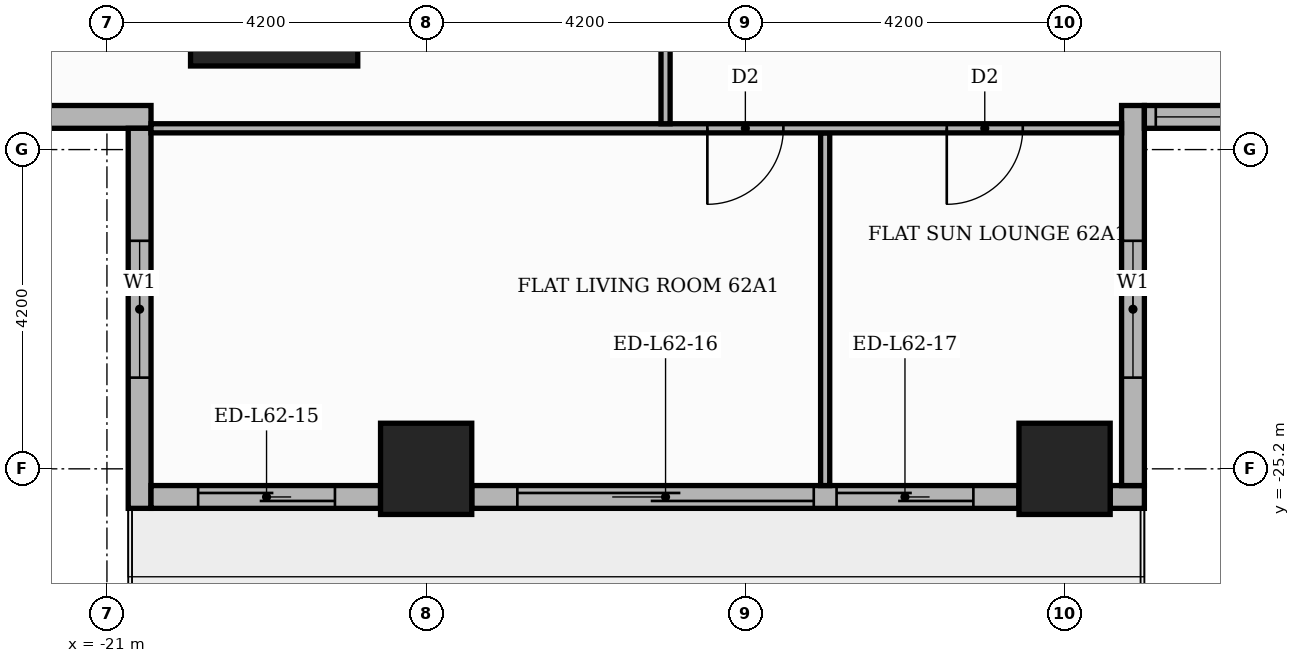
"""IFC4 building model, lengths in metres.
Left out: names, types, materials, properties, quantities, classifications, styles, units other than length and angle.
Written with IfcOpenShell. Run it as: python <this file> out.ifc"""

import sys

from ifc_helpers import new_model, si_unit, direction, frame, frame_2d, origin, origin_2d, place, context, subcontext, project, spatial, rectangle, extrude, element, fill, save


model = new_model("IFC4")
c1 = context("Model", 3, precision=1e-05, world=origin(), true_north=direction((0.0, 1.0)))
c2 = subcontext(c1, "Body", "Model", "MODEL_VIEW")
j1 = project(units=[si_unit("LENGTHUNIT", "METRE"), si_unit("PLANEANGLEUNIT", "RADIAN")], contexts=[c1])
p1 = place(None, origin())
s1 = spatial("IfcSite", under=j1, at=p1, CompositionType="ELEMENT")
p2 = place(p1, origin())
s2 = spatial("IfcBuilding", under=s1, at=p2, CompositionType="ELEMENT")
p3 = place(p2, frame((0.0, 0.0, 260.1)))
s3 = spatial("IfcBuildingStorey", under=s2, at=p3, CompositionType="ELEMENT", Elevation=260.1)
p4 = place(p3, frame((-18.8, -18.8, 0.0), z_axis=(0.0, 0.0, 1.0), x_axis=(1.0, 0.0, 0.0)))
e1 = element("IfcColumn", 1, at=p4, inside=s3, PredefinedType="COLUMN", context=c2, shape_type="SweptSolid", body=[
    extrude(rectangle(XDim=2.2, YDim=2.2, at=origin_2d()), origin(), (0.0, 0.0, 1.0), 3.9),
])
for number, where, z_axis, x_axis in (
    (2, (-8.4, -25.2, 0.0), (0.0, 0.0, 1.0), (1.0, 0.0, 0.0)),
    (3, (-16.8, -25.2, 0.0), (0.0, 0.0, 1.0), (1.0, 0.0, 0.0)),
):
    element("IfcColumn", number, at=place(p3, frame(where, z_axis=z_axis, x_axis=x_axis)), inside=s3, PredefinedType="COLUMN", context=c2, shape_type="SweptSolid", body=[
        extrude(rectangle(XDim=1.2, YDim=1.2, at=origin_2d()), origin(), (0.0, 0.0, 1.0), 3.9),
    ])
p5 = place(p3, frame((-25.42, -20.57, 0.0), z_axis=(0.0, 0.0, 1.0), x_axis=(1.0, 0.0, 0.0)))
e4 = element("IfcWall", 4, at=p5, inside=s3, PredefinedType="STANDARD", context=c2, shape_type="SweptSolid", body=[
    extrude(rectangle(XDim=5.0, YDim=0.3, at=frame_2d((2.5, 0.0))), origin(), (0.0, 0.0, 1.0), 3.48),
])
p6 = place(p5, frame((1.42, 0.0, 0.9)))
e5 = element("IfcOpeningElement", 5, at=p6, cuts=e4, PredefinedType="OPENING", context=c2, shape_type="SweptSolid", body=[
    extrude(rectangle(XDim=1.8, YDim=2.1, at=frame_2d((0.9, 1.05))), frame((0.0, 0.16, 0.0), z_axis=(0.0, -1.0, 0.0), x_axis=(1.0, 0.0, 0.0)), (0.0, 0.0, 1.0), 0.32),
])
p7 = place(p3, frame((-20.57, -20.72, 0.0), z_axis=(0.0, 0.0, 1.0), x_axis=(0.0, -1.0, 0.0)))
e6 = element("IfcWall", 6, at=p7, inside=s3, PredefinedType="STANDARD", context=c2, shape_type="SweptSolid", body=[
    extrude(rectangle(XDim=5.0, YDim=0.3, at=frame_2d((2.5, 0.0))), origin(), (0.0, 0.0, 1.0), 3.48),
])
p8 = place(p7, frame((1.48, 0.0, 0.9)))
e7 = element("IfcOpeningElement", 7, at=p8, cuts=e6, PredefinedType="OPENING", context=c2, shape_type="SweptSolid", body=[
    extrude(rectangle(XDim=1.8, YDim=2.1, at=frame_2d((0.9, 1.05))), frame((0.0, 0.16, 0.0), z_axis=(0.0, -1.0, 0.0), x_axis=(1.0, 0.0, 0.0)), (0.0, 0.0, 1.0), 0.32),
])
p9 = place(p3, frame((-20.42, -25.57, 0.0), z_axis=(0.0, 0.0, 1.0), x_axis=(1.0, 0.0, 0.0)))
e8 = element("IfcWall", 8, at=p9, inside=s3, PredefinedType="STANDARD", context=c2, shape_type="SweptSolid", body=[
    extrude(rectangle(XDim=3.02, YDim=0.3, at=frame_2d((1.51, 0.0))), origin(), (0.0, 0.0, 1.0), 3.48),
])
p10 = place(p9, frame((0.62, 0.0, 0.0)))
e9 = element("IfcOpeningElement", 9, at=p10, cuts=e8, PredefinedType="OPENING", context=c2, shape_type="SweptSolid", body=[
    extrude(rectangle(XDim=1.8, YDim=2.4, at=frame_2d((0.9, 1.2))), frame((0.0, 0.16, 0.0), z_axis=(0.0, -1.0, 0.0), x_axis=(1.0, 0.0, 0.0)), (0.0, 0.0, 1.0), 0.32),
])
p11 = place(p3, frame((-16.2, -25.57, 0.0), z_axis=(0.0, 0.0, 1.0), x_axis=(1.0, 0.0, 0.0)))
e10 = element("IfcWall", 10, at=p11, inside=s3, PredefinedType="STANDARD", context=c2, shape_type="SweptSolid", body=[
    extrude(rectangle(XDim=7.2, YDim=0.3, at=frame_2d((3.6, 0.0))), origin(), (0.0, 0.0, 1.0), 3.48),
])
p12 = place(p11, frame((0.6, 0.0, 0.0)))
e11 = element("IfcOpeningElement", 11, at=p12, cuts=e10, PredefinedType="OPENING", context=c2, shape_type="SweptSolid", body=[
    extrude(rectangle(XDim=3.9, YDim=2.4, at=frame_2d((1.95, 1.2))), frame((0.0, 0.16, 0.0), z_axis=(0.0, -1.0, 0.0), x_axis=(1.0, 0.0, 0.0)), (0.0, 0.0, 1.0), 0.32),
])
p13 = place(p11, frame((4.8, 0.0, 0.0)))
e12 = element("IfcOpeningElement", 12, at=p13, cuts=e10, PredefinedType="OPENING", context=c2, shape_type="SweptSolid", body=[
    extrude(rectangle(XDim=1.8, YDim=2.4, at=frame_2d((0.9, 1.2))), frame((0.0, 0.16, 0.0), z_axis=(0.0, -1.0, 0.0), x_axis=(1.0, 0.0, 0.0)), (0.0, 0.0, 1.0), 0.32),
])
p14 = place(p3, frame((-7.8, -25.57, 0.0), z_axis=(0.0, 0.0, 1.0), x_axis=(1.0, 0.0, 0.0)))
e13 = element("IfcWall", 13, at=p14, inside=s3, PredefinedType="STANDARD", context=c2, shape_type="SweptSolid", body=[
    extrude(rectangle(XDim=0.45, YDim=0.3, at=frame_2d((0.225, 0.0))), origin(), (0.0, 0.0, 1.0), 3.48),
])
p15 = place(p3, frame((-7.5, -25.42, 0.0), z_axis=(0.0, 0.0, 1.0), x_axis=(0.0, 1.0, 0.0)))
e14 = element("IfcWall", 14, at=p15, inside=s3, PredefinedType="STANDARD", context=c2, shape_type="SweptSolid", body=[
    extrude(rectangle(XDim=5.0, YDim=0.3, at=frame_2d((2.5, 0.0))), origin(), (0.0, 0.0, 1.0), 3.48),
])
p16 = place(p15, frame((1.42, 0.0, 0.9)))
e15 = element("IfcOpeningElement", 15, at=p16, cuts=e14, PredefinedType="OPENING", context=c2, shape_type="SweptSolid", body=[
    extrude(rectangle(XDim=1.8, YDim=2.1, at=frame_2d((0.9, 1.05))), frame((0.0, 0.16, 0.0), z_axis=(0.0, -1.0, 0.0), x_axis=(1.0, 0.0, 0.0)), (0.0, 0.0, 1.0), 0.32),
])
p17 = place(p3, frame((-7.35, -20.57, 0.0), z_axis=(0.0, 0.0, 1.0), x_axis=(1.0, 0.0, 0.0)))
e16 = element("IfcWall", 16, at=p17, inside=s3, PredefinedType="STANDARD", context=c2, shape_type="SweptSolid", body=[
    extrude(rectangle(XDim=15.0, YDim=0.3, at=frame_2d((7.5, 0.0))), origin(), (0.0, 0.0, 1.0), 3.48),
])
p18 = place(p17, frame((0.15, 0.0, 0.9)))
e17 = element("IfcOpeningElement", 17, at=p18, cuts=e16, PredefinedType="OPENING", context=c2, shape_type="SweptSolid", body=[
    extrude(rectangle(XDim=6.0, YDim=2.1, at=frame_2d((3.0, 1.05))), frame((0.0, 0.16, 0.0), z_axis=(0.0, -1.0, 0.0), x_axis=(1.0, 0.0, 0.0)), (0.0, 0.0, 1.0), 0.32),
])
p19 = place(p17, frame((6.45, 0.0, 0.9)))
e18 = element("IfcOpeningElement", 18, at=p19, cuts=e16, PredefinedType="OPENING", context=c2, shape_type="SweptSolid", body=[
    extrude(rectangle(XDim=6.0, YDim=2.1, at=frame_2d((3.0, 1.05))), frame((0.0, 0.16, 0.0), z_axis=(0.0, -1.0, 0.0), x_axis=(1.0, 0.0, 0.0)), (0.0, 0.0, 1.0), 0.32),
])
p20 = place(p17, frame((12.75, 0.0, 0.9)))
e19 = element("IfcOpeningElement", 19, at=p20, cuts=e16, PredefinedType="OPENING", context=c2, shape_type="SweptSolid", body=[
    extrude(rectangle(XDim=1.8, YDim=2.1, at=frame_2d((0.9, 1.05))), frame((0.0, 0.16, 0.0), z_axis=(0.0, -1.0, 0.0), x_axis=(1.0, 0.0, 0.0)), (0.0, 0.0, 1.0), 0.32),
])
p21 = place(p3, frame((-11.55, -25.42, 0.0), z_axis=(0.0, 0.0, 1.0), x_axis=(0.0, 1.0, 0.0)))
e20 = element("IfcWall", 20, at=p21, inside=s3, PredefinedType="PARTITIONING", context=c2, shape_type="SweptSolid", body=[
    extrude(rectangle(XDim=4.64, YDim=0.12, at=frame_2d((2.32, 0.0))), origin(), (0.0, 0.0, 1.0), 3.48),
])
p22 = place(p3, frame((-20.42, -20.72, 0.0), z_axis=(0.0, 0.0, 1.0), x_axis=(1.0, 0.0, 0.0)))
e21 = element("IfcWall", 21, at=p22, inside=s3, PredefinedType="PARTITIONING", context=c2, shape_type="SweptSolid", body=[
    extrude(rectangle(XDim=12.77, YDim=0.12, at=frame_2d((6.385, 0.0))), origin(), (0.0, 0.0, 1.0), 3.48),
])
p23 = place(p22, frame((7.32, 0.0, 0.0)))
e22 = element("IfcOpeningElement", 22, at=p23, cuts=e21, PredefinedType="OPENING", context=c2, shape_type="SweptSolid", body=[
    extrude(rectangle(XDim=1.0, YDim=2.1, at=frame_2d((0.5, 1.05))), frame((0.0, 0.07, 0.0), z_axis=(0.0, -1.0, 0.0), x_axis=(1.0, 0.0, 0.0)), (0.0, 0.0, 1.0), 0.14),
])
p24 = place(p22, frame((10.47, 0.0, 0.0)))
e23 = element("IfcOpeningElement", 23, at=p24, cuts=e21, PredefinedType="OPENING", context=c2, shape_type="SweptSolid", body=[
    extrude(rectangle(XDim=1.0, YDim=2.1, at=frame_2d((0.5, 1.05))), frame((0.0, 0.07, 0.0), z_axis=(0.0, -1.0, 0.0), x_axis=(1.0, 0.0, 0.0)), (0.0, 0.0, 1.0), 0.14),
])
p25 = place(p3, frame((-13.65, -20.66, 0.0), z_axis=(0.0, 0.0, 1.0), x_axis=(0.0, 1.0, 0.0)))
e24 = element("IfcWall", 24, at=p25, inside=s3, PredefinedType="PARTITIONING", context=c2, shape_type="SweptSolid", body=[
    extrude(rectangle(XDim=6.91, YDim=0.12, at=frame_2d((3.455, 0.0))), origin(), (0.0, 0.0, 1.0), 3.48),
])
p26 = place(p25, frame((3.025, 0.0, 0.0)))
e25 = element("IfcOpeningElement", 25, at=p26, cuts=e24, PredefinedType="OPENING", context=c2, shape_type="SweptSolid", body=[
    extrude(rectangle(XDim=0.9, YDim=2.1, at=frame_2d((0.45, 1.05))), frame((0.0, 0.07, 0.0), z_axis=(0.0, -1.0, 0.0), x_axis=(1.0, 0.0, 0.0)), (0.0, 0.0, 1.0), 0.14),
])
p27 = place(p8, origin())
e26 = element("IfcWindow", 26, at=p27, inside=s3, PartitioningType="SINGLE_PANEL", PredefinedType="WINDOW", context=c2, shape_type="SweptSolid", body=[
    extrude(rectangle(XDim=1.8, YDim=2.1, at=frame_2d((0.9, 1.05))), frame((0.0, 0.03, 0.0), z_axis=(0.0, -1.0, 0.0), x_axis=(1.0, 0.0, 0.0)), (0.0, 0.0, 1.0), 0.06),
])
fill(e7, e26)
p28 = place(p10, origin())
e27 = element("IfcDoor", 27, at=p28, inside=s3, OperationType="SLIDING_TO_RIGHT", PredefinedType="DOOR", context=c2, shape_type="SweptSolid", body=[
    extrude(rectangle(XDim=1.8, YDim=2.4, at=frame_2d((0.9, 1.2))), frame((0.0, 0.025, 0.0), z_axis=(0.0, -1.0, 0.0), x_axis=(1.0, 0.0, 0.0)), (0.0, 0.0, 1.0), 0.05),
])
fill(e9, e27)
p29 = place(p12, origin())
e28 = element("IfcDoor", 28, at=p29, inside=s3, OperationType="SLIDING_TO_LEFT", PredefinedType="DOOR", context=c2, shape_type="SweptSolid", body=[
    extrude(rectangle(XDim=3.9, YDim=2.4, at=frame_2d((1.95, 1.2))), frame((0.0, 0.025, 0.0), z_axis=(0.0, -1.0, 0.0), x_axis=(1.0, 0.0, 0.0)), (0.0, 0.0, 1.0), 0.05),
])
fill(e11, e28)
p30 = place(p13, origin())
e29 = element("IfcDoor", 29, at=p30, inside=s3, OperationType="SLIDING_TO_RIGHT", PredefinedType="DOOR", context=c2, shape_type="SweptSolid", body=[
    extrude(rectangle(XDim=1.8, YDim=2.4, at=frame_2d((0.9, 1.2))), frame((0.0, 0.025, 0.0), z_axis=(0.0, -1.0, 0.0), x_axis=(1.0, 0.0, 0.0)), (0.0, 0.0, 1.0), 0.05),
])
fill(e12, e29)
p31 = place(p16, origin())
e30 = element("IfcWindow", 30, at=p31, inside=s3, PartitioningType="SINGLE_PANEL", PredefinedType="WINDOW", context=c2, shape_type="SweptSolid", body=[
    extrude(rectangle(XDim=1.8, YDim=2.1, at=frame_2d((0.9, 1.05))), frame((0.0, 0.03, 0.0), z_axis=(0.0, -1.0, 0.0), x_axis=(1.0, 0.0, 0.0)), (0.0, 0.0, 1.0), 0.06),
])
fill(e15, e30)
p32 = place(p18, origin())
e31 = element("IfcWindow", 31, at=p32, inside=s3, PartitioningType="SINGLE_PANEL", PredefinedType="WINDOW", context=c2, shape_type="SweptSolid", body=[
    extrude(rectangle(XDim=6.0, YDim=2.1, at=frame_2d((3.0, 1.05))), frame((0.0, 0.03, 0.0), z_axis=(0.0, -1.0, 0.0), x_axis=(1.0, 0.0, 0.0)), (0.0, 0.0, 1.0), 0.06),
])
fill(e17, e31)
p33 = place(p23, frame((1.0, 0.0, 0.0), z_axis=(0.0, 0.0, 1.0), x_axis=(-1.0, 0.0, 0.0)))
e32 = element("IfcDoor", 32, at=p33, inside=s3, OperationType="SINGLE_SWING_LEFT", PredefinedType="DOOR", context=c2, shape_type="SweptSolid", body=[
    extrude(rectangle(XDim=1.0, YDim=2.1, at=frame_2d((0.5, 1.05))), frame((0.0, 0.025, 0.0), z_axis=(0.0, -1.0, 0.0), x_axis=(1.0, 0.0, 0.0)), (0.0, 0.0, 1.0), 0.05),
])
fill(e22, e32)
p34 = place(p24, frame((1.0, 0.0, 0.0), z_axis=(0.0, 0.0, 1.0), x_axis=(-1.0, 0.0, 0.0)))
e33 = element("IfcDoor", 33, at=p34, inside=s3, OperationType="SINGLE_SWING_LEFT", PredefinedType="DOOR", context=c2, shape_type="SweptSolid", body=[
    extrude(rectangle(XDim=1.0, YDim=2.1, at=frame_2d((0.5, 1.05))), frame((0.0, 0.025, 0.0), z_axis=(0.0, -1.0, 0.0), x_axis=(1.0, 0.0, 0.0)), (0.0, 0.0, 1.0), 0.05),
])
fill(e23, e33)
save(model, sys.argv[1])
